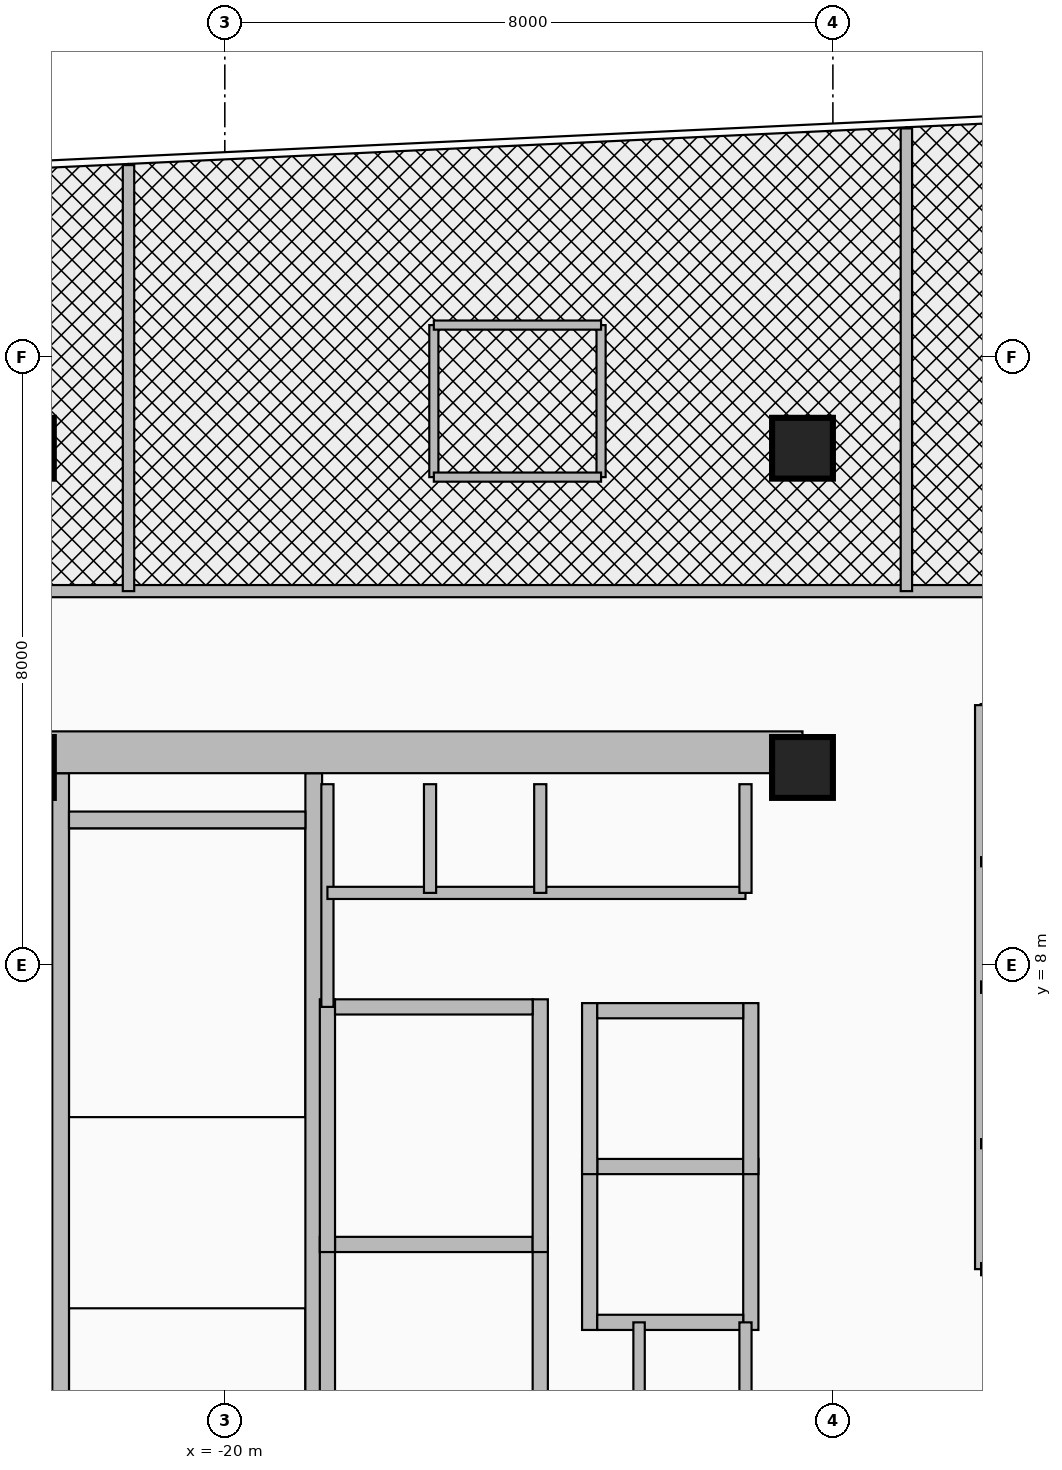
"""IFC4 building model, lengths in metres.
Left out: names, types, materials, properties, quantities, classifications, styles, units other than length and angle.
Written with IfcOpenShell. Run it as: python <this file> out.ifc"""

import sys

from ifc_helpers import new_model, si_unit, direction, frame, frame_2d, origin, origin_2d, place, context, subcontext, project, spatial, rectangle, extrude, source, transform, mapped, element, fill, save


model = new_model("IFC4")
c1 = context("Model", 3, precision=1e-05, world=origin(), true_north=direction((0.0, 1.0)))
c2 = subcontext(c1, "Body", "Model", "MODEL_VIEW")
j1 = project(units=[si_unit("LENGTHUNIT", "METRE"), si_unit("PLANEANGLEUNIT", "RADIAN")], contexts=[c1])
p1 = place(None, origin())
s1 = spatial("IfcSite", under=j1, at=p1, CompositionType="ELEMENT")
p2 = place(p1, origin())
s2 = spatial("IfcBuilding", under=s1, at=p2, CompositionType="ELEMENT")
p3 = place(p2, frame((0.0, 0.0, 240.5)))
s3 = spatial("IfcBuildingStorey", under=s2, at=p3, CompositionType="ELEMENT", Elevation=240.5)
for number, where, z_axis, x_axis in (
    (1, (-22.16, 1.78, 0.0), (0.0, 0.0, 1.0), (0.0, 1.0, 0.0)),
    (2, (-18.83, 1.78, 0.0), (0.0, 0.0, 1.0), (0.0, 1.0, 0.0)),
):
    element("IfcWall", number, at=place(p3, frame(where, z_axis=z_axis, x_axis=x_axis)), inside=s3, PredefinedType="SHEAR", context=c2, shape_type="SweptSolid", body=[
        extrude(rectangle(XDim=8.745, YDim=0.22, at=frame_2d((4.373, 0.0))), origin(), (0.0, 0.0, 1.0), 3.26),
    ])
p4 = place(p3, frame((-22.05, 9.91, 0.0), z_axis=(0.0, 0.0, 1.0), x_axis=(1.0, 0.0, 0.0)))
e3 = element("IfcWall", 3, at=p4, inside=s3, PredefinedType="SHEAR", context=c2, shape_type="SweptSolid", body=[
    extrude(rectangle(XDim=3.11, YDim=0.22, at=frame_2d((1.555, 0.0))), origin(), (0.0, 0.0, 1.0), 3.26),
])
p5 = place(p3, frame((-22.65, 10.8, 0.0), z_axis=(0.0, 0.0, 1.0), x_axis=(1.0, 0.0, 0.0)))
e4 = element("IfcWall", 4, at=p5, inside=s3, PredefinedType="SHEAR", context=c2, shape_type="SweptSolid", body=[
    extrude(rectangle(XDim=10.25, YDim=0.55, at=frame_2d((5.125, 0.0))), origin(), (0.0, 0.0, 1.0), 3.26),
])
m1 = source(origin(), c2, "Body", "SweptSolid", [
    extrude(rectangle(XDim=0.8, YDim=0.8, at=origin_2d()), origin(), (0.0, 0.0, 1.0), 3.5),
])
for number, where, z_axis, x_axis in (
    (5, (-22.65, 10.6, 0.0), (0.0, 0.0, 1.0), (1.0, 0.0, 0.0)),
    (6, (-12.4, 10.6, 0.0), (0.0, 0.0, 1.0), (1.0, 0.0, 0.0)),
    (7, (-22.65, 14.8, 0.0), (0.0, 0.0, 1.0), (1.0, 0.0, 0.0)),
    (8, (-12.4, 14.8, 0.0), (0.0, 0.0, 1.0), (1.0, 0.0, 0.0)),
):
    element("IfcColumn", number, at=place(p3, frame(where, z_axis=z_axis, x_axis=x_axis)), inside=s3, PredefinedType="COLUMN", context=c2, shape_type="MappedRepresentation", body=[
        mapped(m1, transform((0.0, 0.0, 0.0), x_axis=(1.0, 0.0, 0.0), y_axis=(0.0, 1.0, 0.0), z_axis=(0.0, 0.0, 1.0), scale=1.0)),
    ])
for number, where, z_axis, x_axis in (
    (9, (-18.65, 1.2, 0.0), (0.0, 0.0, 1.0), (0.0, 1.0, 0.0)),
    (10, (-15.85, 1.2, 0.0), (0.0, 0.0, 1.0), (0.0, 1.0, 0.0)),
):
    element("IfcWall", number, at=place(p3, frame(where, z_axis=z_axis, x_axis=x_axis)), inside=s3, PredefinedType="MOVABLE", context=c2, shape_type="SweptSolid", body=[
        extrude(rectangle(XDim=3.225, YDim=0.2, at=frame_2d((1.613, 0.0))), origin(), (0.0, 0.0, 1.0), 3.26),
    ])
p6 = place(p3, frame((-18.55, 4.325, 0.0), z_axis=(0.0, 0.0, 1.0), x_axis=(1.0, 0.0, 0.0)))
e11 = element("IfcWall", 11, at=p6, inside=s3, PredefinedType="MOVABLE", context=c2, shape_type="SweptSolid", body=[
    extrude(rectangle(XDim=2.6, YDim=0.2, at=frame_2d((1.3, 0.0))), origin(), (0.0, 0.0, 1.0), 3.26),
])
for number, where, z_axis, x_axis in (
    (12, (-18.65, 4.225, 0.0), (0.0, 0.0, 1.0), (0.0, 1.0, 0.0)),
    (13, (-15.85, 4.225, 0.0), (0.0, 0.0, 1.0), (0.0, 1.0, 0.0)),
):
    element("IfcWall", number, at=place(p3, frame(where, z_axis=z_axis, x_axis=x_axis)), inside=s3, PredefinedType="MOVABLE", context=c2, shape_type="SweptSolid", body=[
        extrude(rectangle(XDim=3.325, YDim=0.2, at=frame_2d((1.663, 0.0))), origin(), (0.0, 0.0, 1.0), 3.26),
    ])
p7 = place(p3, frame((-18.55, 7.45, 0.0), z_axis=(0.0, 0.0, 1.0), x_axis=(1.0, 0.0, 0.0)))
e14 = element("IfcWall", 14, at=p7, inside=s3, PredefinedType="MOVABLE", context=c2, shape_type="SweptSolid", body=[
    extrude(rectangle(XDim=2.6, YDim=0.2, at=frame_2d((1.3, 0.0))), origin(), (0.0, 0.0, 1.0), 3.26),
])
p8 = place(p7, frame((0.7, 0.0, 0.0)))
e15 = element("IfcOpeningElement", 15, at=p8, cuts=e14, PredefinedType="OPENING", context=c2, shape_type="SweptSolid", body=[
    extrude(rectangle(XDim=1.2, YDim=2.1, at=frame_2d((0.6, 1.05))), frame((0.0, 0.115, 0.0), z_axis=(0.0, -1.0, 0.0), x_axis=(1.0, 0.0, 0.0)), (0.0, 0.0, 1.0), 0.23),
])
p9 = place(p3, frame((-15.2, 3.2, 0.0), z_axis=(0.0, 0.0, 1.0), x_axis=(0.0, 1.0, 0.0)))
e16 = element("IfcWall", 16, at=p9, inside=s3, PredefinedType="MOVABLE", context=c2, shape_type="SweptSolid", body=[
    extrude(rectangle(XDim=2.25, YDim=0.2, at=frame_2d((1.125, 0.0))), origin(), (0.0, 0.0, 1.0), 3.26),
])
p10 = place(p3, frame((-13.08, 3.2, 0.0), z_axis=(0.0, 0.0, 1.0), x_axis=(0.0, 1.0, 0.0)))
e17 = element("IfcWall", 17, at=p10, inside=s3, PredefinedType="MOVABLE", context=c2, shape_type="SweptSolid", body=[
    extrude(rectangle(XDim=2.25, YDim=0.2, at=frame_2d((1.125, 0.0))), origin(), (0.0, 0.0, 1.0), 3.26),
])
p11 = place(p10, frame((0.575, 0.0, 0.0)))
e18 = element("IfcOpeningElement", 18, at=p11, cuts=e17, PredefinedType="OPENING", context=c2, shape_type="SweptSolid", body=[
    extrude(rectangle(XDim=1.1, YDim=2.1, at=frame_2d((0.55, 1.05))), frame((0.0, 0.115, 0.0), z_axis=(0.0, -1.0, 0.0), x_axis=(1.0, 0.0, 0.0)), (0.0, 0.0, 1.0), 0.23),
])
for number, where, z_axis, x_axis in (
    (19, (-15.1, 3.3, 0.0), (0.0, 0.0, 1.0), (1.0, 0.0, 0.0)),
    (20, (-15.1, 5.35, 0.0), (0.0, 0.0, 1.0), (1.0, 0.0, 0.0)),
):
    element("IfcWall", number, at=place(p3, frame(where, z_axis=z_axis, x_axis=x_axis)), inside=s3, PredefinedType="MOVABLE", context=c2, shape_type="SweptSolid", body=[
        extrude(rectangle(XDim=1.92, YDim=0.2, at=frame_2d((0.96, 0.0))), origin(), (0.0, 0.0, 1.0), 3.26),
    ])
p12 = place(p3, frame((-15.2, 5.25, 0.0), z_axis=(0.0, 0.0, 1.0), x_axis=(0.0, 1.0, 0.0)))
e21 = element("IfcWall", 21, at=p12, inside=s3, PredefinedType="MOVABLE", context=c2, shape_type="SweptSolid", body=[
    extrude(rectangle(XDim=2.25, YDim=0.2, at=frame_2d((1.125, 0.0))), origin(), (0.0, 0.0, 1.0), 3.26),
])
p13 = place(p3, frame((-13.08, 5.25, 0.0), z_axis=(0.0, 0.0, 1.0), x_axis=(0.0, 1.0, 0.0)))
e22 = element("IfcWall", 22, at=p13, inside=s3, PredefinedType="MOVABLE", context=c2, shape_type="SweptSolid", body=[
    extrude(rectangle(XDim=2.25, YDim=0.2, at=frame_2d((1.125, 0.0))), origin(), (0.0, 0.0, 1.0), 3.26),
])
p14 = place(p13, frame((0.575, 0.0, 0.0)))
e23 = element("IfcOpeningElement", 23, at=p14, cuts=e22, PredefinedType="OPENING", context=c2, shape_type="SweptSolid", body=[
    extrude(rectangle(XDim=1.1, YDim=2.1, at=frame_2d((0.55, 1.05))), frame((0.0, 0.115, 0.0), z_axis=(0.0, -1.0, 0.0), x_axis=(1.0, 0.0, 0.0)), (0.0, 0.0, 1.0), 0.23),
])
p15 = place(p3, frame((-15.1, 7.4, 0.0), z_axis=(0.0, 0.0, 1.0), x_axis=(1.0, 0.0, 0.0)))
e24 = element("IfcWall", 24, at=p15, inside=s3, PredefinedType="MOVABLE", context=c2, shape_type="SweptSolid", body=[
    extrude(rectangle(XDim=1.92, YDim=0.2, at=frame_2d((0.96, 0.0))), origin(), (0.0, 0.0, 1.0), 3.26),
])
p16 = place(p3, frame((-18.65, 7.45, 0.0), z_axis=(0.0, 0.0, 1.0), x_axis=(0.0, 1.0, 0.0)))
e25 = element("IfcWall", 25, at=p16, inside=s3, PredefinedType="PARTITIONING", context=c2, shape_type="SweptSolid", body=[
    extrude(rectangle(XDim=2.93, YDim=0.16, at=frame_2d((1.465, 0.0))), origin(), (0.0, 0.0, 1.0), 3.26),
])
p17 = place(p3, frame((-18.65, 8.95, 0.0), z_axis=(0.0, 0.0, 1.0), x_axis=(1.0, 0.0, 0.0)))
e26 = element("IfcWall", 26, at=p17, inside=s3, PredefinedType="PARTITIONING", context=c2, shape_type="SweptSolid", body=[
    extrude(rectangle(XDim=5.5, YDim=0.16, at=frame_2d((2.75, 0.0))), origin(), (0.0, 0.0, 1.0), 3.26),
])
p18 = place(p17, frame((0.3, 0.0, 0.0)))
e27 = element("IfcOpeningElement", 27, at=p18, cuts=e26, PredefinedType="OPENING", context=c2, shape_type="SweptSolid", body=[
    extrude(rectangle(XDim=0.85, YDim=2.05, at=frame_2d((0.425, 1.025))), frame((0.0, 0.095, 0.0), z_axis=(0.0, -1.0, 0.0), x_axis=(1.0, 0.0, 0.0)), (0.0, 0.0, 1.0), 0.19),
])
p19 = place(p17, frame((3.2, 0.0, 0.0)))
e28 = element("IfcOpeningElement", 28, at=p19, cuts=e26, PredefinedType="OPENING", context=c2, shape_type="SweptSolid", body=[
    extrude(rectangle(XDim=0.85, YDim=2.05, at=frame_2d((0.425, 1.025))), frame((0.0, 0.095, 0.0), z_axis=(0.0, -1.0, 0.0), x_axis=(1.0, 0.0, 0.0)), (0.0, 0.0, 1.0), 0.19),
])
for number, where, z_axis, x_axis in (
    (29, (-13.15, 8.95, 0.0), (0.0, 0.0, 1.0), (0.0, 1.0, 0.0)),
    (30, (-17.3, 8.95, 0.0), (0.0, 0.0, 1.0), (0.0, 1.0, 0.0)),
):
    element("IfcWall", number, at=place(p3, frame(where, z_axis=z_axis, x_axis=x_axis)), inside=s3, PredefinedType="PARTITIONING", context=c2, shape_type="SweptSolid", body=[
        extrude(rectangle(XDim=1.43, YDim=0.16, at=frame_2d((0.715, 0.0))), origin(), (0.0, 0.0, 1.0), 3.26),
    ])
p20 = place(p3, frame((-15.85, 8.95, 0.0), z_axis=(0.0, 0.0, 1.0), x_axis=(0.0, 1.0, 0.0)))
e31 = element("IfcWall", 31, at=p20, inside=s3, PredefinedType="PARTITIONING", context=c2, shape_type="SweptSolid", body=[
    extrude(rectangle(XDim=1.43, YDim=0.16, at=frame_2d((0.715, 0.0))), origin(), (0.0, 0.0, 1.0), 3.26),
])
p21 = place(p20, frame((0.29, 0.0, 0.0)))
e32 = element("IfcOpeningElement", 32, at=p21, cuts=e31, PredefinedType="OPENING", context=c2, shape_type="SweptSolid", body=[
    extrude(rectangle(XDim=0.85, YDim=2.05, at=frame_2d((0.425, 1.025))), frame((0.0, 0.095, 0.0), z_axis=(0.0, -1.0, 0.0), x_axis=(1.0, 0.0, 0.0)), (0.0, 0.0, 1.0), 0.19),
])
p22 = place(p3, frame((-13.15, 1.35, 0.0), z_axis=(0.0, 0.0, 1.0), x_axis=(0.0, 1.0, 0.0)))
e33 = element("IfcWall", 33, at=p22, inside=s3, PredefinedType="PARTITIONING", context=c2, shape_type="SweptSolid", body=[
    extrude(rectangle(XDim=1.95, YDim=0.16, at=frame_2d((0.975, 0.0))), origin(), (0.0, 0.0, 1.0), 3.26),
])
p23 = place(p3, frame((-14.55, 1.35, 0.0), z_axis=(0.0, 0.0, 1.0), x_axis=(0.0, 1.0, 0.0)))
e34 = element("IfcWall", 34, at=p23, inside=s3, PredefinedType="PARTITIONING", context=c2, shape_type="SweptSolid", body=[
    extrude(rectangle(XDim=1.95, YDim=0.15, at=frame_2d((0.975, 0.0))), origin(), (0.0, 0.0, 1.0), 3.26),
])
p24 = place(p3, frame((-30.39, 12.92, 0.0), z_axis=(0.0, 0.0, 1.0), x_axis=(1.0, 0.0, 0.0)))
e35 = element("IfcWall", 35, at=p24, inside=s3, PredefinedType="PARTITIONING", context=c2, shape_type="SweptSolid", body=[
    extrude(rectangle(XDim=29.48, YDim=0.16, at=frame_2d((14.74, 0.0))), origin(), (0.0, 0.0, 1.0), 2.634),
])
p25 = place(p24, frame((4.087, 0.0, 0.0)))
e36 = element("IfcOpeningElement", 36, at=p25, cuts=e35, PredefinedType="OPENING", context=c2, shape_type="SweptSolid", body=[
    extrude(rectangle(XDim=0.95, YDim=2.15, at=frame_2d((0.475, 1.075))), frame((0.0, 0.095, 0.0), z_axis=(0.0, -1.0, 0.0), x_axis=(1.0, 0.0, 0.0)), (0.0, 0.0, 1.0), 0.19),
])
p26 = place(p24, frame((13.765, 0.0, 0.0)))
e37 = element("IfcOpeningElement", 37, at=p26, cuts=e35, PredefinedType="OPENING", context=c2, shape_type="SweptSolid", body=[
    extrude(rectangle(XDim=0.95, YDim=2.15, at=frame_2d((0.475, 1.075))), frame((0.0, 0.095, 0.0), z_axis=(0.0, -1.0, 0.0), x_axis=(1.0, 0.0, 0.0)), (0.0, 0.0, 1.0), 0.19),
])
p27 = place(p24, frame((22.843, 0.0, 0.0)))
e38 = element("IfcOpeningElement", 38, at=p27, cuts=e35, PredefinedType="OPENING", context=c2, shape_type="SweptSolid", body=[
    extrude(rectangle(XDim=0.95, YDim=2.15, at=frame_2d((0.475, 1.075))), frame((0.0, 0.095, 0.0), z_axis=(0.0, -1.0, 0.0), x_axis=(1.0, 0.0, 0.0)), (0.0, 0.0, 1.0), 0.19),
])
p28 = place(p3, frame((-21.267, 12.92, 0.0), z_axis=(0.0, 0.0, 1.0), x_axis=(0.0, 1.0, 0.0)))
e39 = element("IfcWall", 39, at=p28, inside=s3, PredefinedType="PARTITIONING", context=c2, shape_type="SweptSolid", body=[
    extrude(rectangle(XDim=5.605, YDim=0.15, at=frame_2d((2.803, 0.0))), origin(), (0.0, 0.0, 1.0), 2.544),
])
p29 = place(p3, frame((-11.033, 12.92, 0.0), z_axis=(0.0, 0.0, 1.0), x_axis=(0.0, 1.0, 0.0)))
e40 = element("IfcWall", 40, at=p29, inside=s3, PredefinedType="PARTITIONING", context=c2, shape_type="SweptSolid", body=[
    extrude(rectangle(XDim=6.088, YDim=0.15, at=frame_2d((3.044, 0.0))), origin(), (0.0, 0.0, 1.0), 3.26),
])
for number, where, z_axis, x_axis in (
    (41, (-17.25, 14.42, 0.0), (0.0, 0.0, 1.0), (0.0, 1.0, 0.0)),
    (42, (-15.05, 14.42, 0.0), (0.0, 0.0, 1.0), (0.0, 1.0, 0.0)),
):
    element("IfcWall", number, at=place(p3, frame(where, z_axis=z_axis, x_axis=x_axis)), inside=s3, PredefinedType="PARTITIONING", context=c2, shape_type="SweptSolid", body=[
        extrude(rectangle(XDim=2.0, YDim=0.12, at=frame_2d((1.0, 0.0))), origin(), (0.0, 0.0, 1.0), 2.544),
    ])
p30 = place(p3, frame((-17.25, 16.42, 0.0), z_axis=(0.0, 0.0, 1.0), x_axis=(1.0, 0.0, 0.0)))
e43 = element("IfcWall", 43, at=p30, inside=s3, PredefinedType="PARTITIONING", context=c2, shape_type="SweptSolid", body=[
    extrude(rectangle(XDim=2.2, YDim=0.12, at=frame_2d((1.1, 0.0))), origin(), (0.0, 0.0, 1.0), 3.26),
])
p31 = place(p3, frame((-17.25, 14.42, 0.0), z_axis=(0.0, 0.0, 1.0), x_axis=(1.0, 0.0, 0.0)))
e44 = element("IfcWall", 44, at=p31, inside=s3, PredefinedType="PARTITIONING", context=c2, shape_type="SweptSolid", body=[
    extrude(rectangle(XDim=2.2, YDim=0.12, at=frame_2d((1.1, 0.0))), origin(), (0.0, 0.0, 1.0), 3.26),
])
p32 = place(p31, frame((0.675, 0.0, 0.0)))
e45 = element("IfcOpeningElement", 45, at=p32, cuts=e44, PredefinedType="OPENING", context=c2, shape_type="SweptSolid", body=[
    extrude(rectangle(XDim=0.85, YDim=2.1, at=frame_2d((0.425, 1.05))), frame((0.0, 0.075, 0.0), z_axis=(0.0, -1.0, 0.0), x_axis=(1.0, 0.0, 0.0)), (0.0, 0.0, 1.0), 0.15),
])
p33 = place(p3, frame((-10.05, 4.0, 0.0), z_axis=(0.0, 0.0, 1.0), x_axis=(0.0, 1.0, 0.0)))
e46 = element("IfcWall", 46, at=p33, inside=s3, PredefinedType="PARTITIONING", context=c2, shape_type="SweptSolid", body=[
    extrude(rectangle(XDim=7.42, YDim=0.16, at=frame_2d((3.71, 0.0))), origin(), (0.0, 0.0, 1.0), 3.26),
])
p34 = place(p33, frame((2.205, 0.0, 0.0)))
e47 = element("IfcOpeningElement", 47, at=p34, cuts=e46, PredefinedType="OPENING", context=c2, shape_type="SweptSolid", body=[
    extrude(rectangle(XDim=0.95, YDim=2.15, at=frame_2d((0.475, 1.075))), frame((0.0, 0.095, 0.0), z_axis=(0.0, -1.0, 0.0), x_axis=(1.0, 0.0, 0.0)), (0.0, 0.0, 1.0), 0.19),
])
p35 = place(p33, frame((5.915, 0.0, 0.0)))
e48 = element("IfcOpeningElement", 48, at=p35, cuts=e46, PredefinedType="OPENING", context=c2, shape_type="SweptSolid", body=[
    extrude(rectangle(XDim=0.95, YDim=2.15, at=frame_2d((0.475, 1.075))), frame((0.0, 0.095, 0.0), z_axis=(0.0, -1.0, 0.0), x_axis=(1.0, 0.0, 0.0)), (0.0, 0.0, 1.0), 0.19),
])
p36 = place(p3, frame((-10.05, 4.0, 0.0), z_axis=(0.0, 0.0, 1.0), x_axis=(1.0, 0.0, 0.0)))
e49 = element("IfcWall", 49, at=p36, inside=s3, PredefinedType="PARTITIONING", context=c2, shape_type="SweptSolid", body=[
    extrude(rectangle(XDim=2.546, YDim=0.16, at=frame_2d((1.273, 0.0))), origin(), (0.0, 0.0, 1.0), 3.26),
])
p37 = place(p3, frame((-10.05, 7.71, 0.0), z_axis=(0.0, 0.0, 1.0), x_axis=(1.0, 0.0, 0.0)))
e50 = element("IfcWall", 50, at=p37, inside=s3, PredefinedType="PARTITIONING", context=c2, shape_type="SweptSolid", body=[
    extrude(rectangle(XDim=9.14, YDim=0.15, at=frame_2d((4.57, 0.0))), origin(), (0.0, 0.0, 1.0), 3.26),
])
for number, where, z_axis, x_axis in (
    (51, (-10.05, 5.65, 0.0), (0.0, 0.0, 1.0), (1.0, 0.0, 0.0)),
    (52, (-10.05, 9.36, 0.0), (0.0, 0.0, 1.0), (1.0, 0.0, 0.0)),
):
    element("IfcWall", number, at=place(p3, frame(where, z_axis=z_axis, x_axis=x_axis)), inside=s3, PredefinedType="PARTITIONING", context=c2, shape_type="SweptSolid", body=[
        extrude(rectangle(XDim=2.2, YDim=0.12, at=frame_2d((1.1, 0.0))), origin(), (0.0, 0.0, 1.0), 3.26),
    ])
p38 = place(p8, origin())
e53 = element("IfcDoor", 53, at=p38, inside=s3, OperationType="DOUBLE_DOOR_SLIDING", PredefinedType="DOOR", context=c2, shape_type="SweptSolid", body=[
    extrude(rectangle(XDim=1.2, YDim=2.1, at=frame_2d((0.6, 1.05))), frame((0.0, 0.025, 0.0), z_axis=(0.0, -1.0, 0.0), x_axis=(1.0, 0.0, 0.0)), (0.0, 0.0, 1.0), 0.05),
])
fill(e15, e53)
p39 = place(p11, origin())
e54 = element("IfcDoor", 54, at=p39, inside=s3, OperationType="DOUBLE_DOOR_SLIDING", PredefinedType="DOOR", context=c2, shape_type="SweptSolid", body=[
    extrude(rectangle(XDim=1.1, YDim=2.1, at=frame_2d((0.55, 1.05))), frame((0.0, 0.025, 0.0), z_axis=(0.0, -1.0, 0.0), x_axis=(1.0, 0.0, 0.0)), (0.0, 0.0, 1.0), 0.05),
])
fill(e18, e54)
p40 = place(p14, origin())
e55 = element("IfcDoor", 55, at=p40, inside=s3, OperationType="DOUBLE_DOOR_SLIDING", PredefinedType="DOOR", context=c2, shape_type="SweptSolid", body=[
    extrude(rectangle(XDim=1.1, YDim=2.1, at=frame_2d((0.55, 1.05))), frame((0.0, 0.025, 0.0), z_axis=(0.0, -1.0, 0.0), x_axis=(1.0, 0.0, 0.0)), (0.0, 0.0, 1.0), 0.05),
])
fill(e23, e55)
p41 = place(p18, origin())
e56 = element("IfcDoor", 56, at=p41, inside=s3, OperationType="SINGLE_SWING_LEFT", PredefinedType="DOOR", context=c2, shape_type="SweptSolid", body=[
    extrude(rectangle(XDim=0.85, YDim=2.05, at=frame_2d((0.425, 1.025))), frame((0.0, 0.025, 0.0), z_axis=(0.0, -1.0, 0.0), x_axis=(1.0, 0.0, 0.0)), (0.0, 0.0, 1.0), 0.05),
])
fill(e27, e56)
p42 = place(p19, origin())
e57 = element("IfcDoor", 57, at=p42, inside=s3, OperationType="SINGLE_SWING_RIGHT", PredefinedType="DOOR", context=c2, shape_type="SweptSolid", body=[
    extrude(rectangle(XDim=0.85, YDim=2.05, at=frame_2d((0.425, 1.025))), frame((0.0, 0.025, 0.0), z_axis=(0.0, -1.0, 0.0), x_axis=(1.0, 0.0, 0.0)), (0.0, 0.0, 1.0), 0.05),
])
fill(e28, e57)
p43 = place(p21, origin())
e58 = element("IfcDoor", 58, at=p43, inside=s3, OperationType="SINGLE_SWING_LEFT", PredefinedType="DOOR", context=c2, shape_type="SweptSolid", body=[
    extrude(rectangle(XDim=0.85, YDim=2.05, at=frame_2d((0.425, 1.025))), frame((0.0, 0.025, 0.0), z_axis=(0.0, -1.0, 0.0), x_axis=(1.0, 0.0, 0.0)), (0.0, 0.0, 1.0), 0.05),
])
fill(e32, e58)
p44 = place(p26, frame((0.95, 0.0, 0.0), z_axis=(0.0, 0.0, 1.0), x_axis=(-1.0, 0.0, 0.0)))
e59 = element("IfcDoor", 59, at=p44, inside=s3, OperationType="SINGLE_SWING_LEFT", PredefinedType="DOOR", context=c2, shape_type="SweptSolid", body=[
    extrude(rectangle(XDim=0.95, YDim=2.15, at=frame_2d((0.475, 1.075))), frame((0.0, 0.025, 0.0), z_axis=(0.0, -1.0, 0.0), x_axis=(1.0, 0.0, 0.0)), (0.0, 0.0, 1.0), 0.05),
])
fill(e37, e59)
p45 = place(p32, origin())
e60 = element("IfcDoor", 60, at=p45, inside=s3, OperationType="SINGLE_SWING_RIGHT", PredefinedType="DOOR", context=c2, shape_type="SweptSolid", body=[
    extrude(rectangle(XDim=0.85, YDim=2.1, at=frame_2d((0.425, 1.05))), frame((0.0, 0.025, 0.0), z_axis=(0.0, -1.0, 0.0), x_axis=(1.0, 0.0, 0.0)), (0.0, 0.0, 1.0), 0.05),
])
fill(e45, e60)
p46 = place(p34, frame((0.95, 0.0, 0.0), z_axis=(0.0, 0.0, 1.0), x_axis=(-1.0, 0.0, 0.0)))
e61 = element("IfcDoor", 61, at=p46, inside=s3, OperationType="SINGLE_SWING_LEFT", PredefinedType="DOOR", context=c2, shape_type="SweptSolid", body=[
    extrude(rectangle(XDim=0.95, YDim=2.15, at=frame_2d((0.475, 1.075))), frame((0.0, 0.025, 0.0), z_axis=(0.0, -1.0, 0.0), x_axis=(1.0, 0.0, 0.0)), (0.0, 0.0, 1.0), 0.05),
])
fill(e47, e61)
p47 = place(p35, frame((0.95, 0.0, 0.0), z_axis=(0.0, 0.0, 1.0), x_axis=(-1.0, 0.0, 0.0)))
e62 = element("IfcDoor", 62, at=p47, inside=s3, OperationType="SINGLE_SWING_LEFT", PredefinedType="DOOR", context=c2, shape_type="SweptSolid", body=[
    extrude(rectangle(XDim=0.95, YDim=2.15, at=frame_2d((0.475, 1.075))), frame((0.0, 0.025, 0.0), z_axis=(0.0, -1.0, 0.0), x_axis=(1.0, 0.0, 0.0)), (0.0, 0.0, 1.0), 0.05),
])
fill(e48, e62)
save(model, sys.argv[1])
